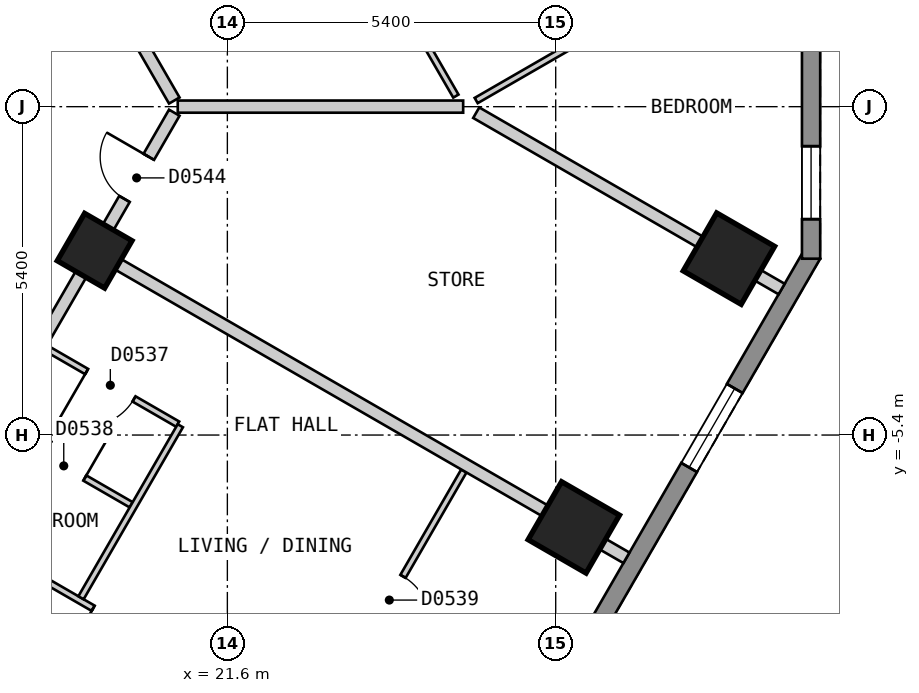
"""IFC4 building model, lengths in metres.
Left out: names, types, materials, properties, quantities, classifications, styles, units other than length and angle.
Written with IfcOpenShell. Run it as: python <this file> out.ifc"""

import sys

from ifc_helpers import new_model, si_unit, direction, frame, frame_2d, origin, origin_2d, place, context, subcontext, project, spatial, polyline, rectangle, outline, extrude, element, fill, save


model = new_model("IFC4")
c1 = context("Model", 3, precision=1e-05, world=origin(), true_north=direction((0.0, 1.0)))
c2 = subcontext(c1, "Body", "Model", "MODEL_VIEW")
j1 = project(units=[si_unit("LENGTHUNIT", "METRE"), si_unit("PLANEANGLEUNIT", "RADIAN")], contexts=[c1])
p1 = place(None, origin())
s1 = spatial("IfcSite", under=j1, at=p1, CompositionType="ELEMENT")
p2 = place(p1, origin())
s2 = spatial("IfcBuilding", under=s1, at=p2, CompositionType="ELEMENT")
p3 = place(p2, frame((0.0, 0.0, 50.4)))
s3 = spatial("IfcBuildingStorey", under=s2, at=p3, CompositionType="ELEMENT", Elevation=50.4)
for number, where, z_axis, x_axis in (
    (1, (27.298, -6.919, 0.0), (0.0, 0.0, 1.0), (0.5, 0.866, 0.0)),
    (2, (29.849, -2.499, 0.0), (0.0, 0.0, 1.0), (0.5, 0.866, 0.0)),
):
    element("IfcColumn", number, at=place(p3, frame(where, z_axis=z_axis, x_axis=x_axis)), inside=s3, PredefinedType="COLUMN", context=c2, shape_type="SweptSolid", body=[
        extrude(rectangle(XDim=1.1, YDim=1.1, at=origin_2d()), origin(), (0.0, 0.0, 1.0), 3.0),
    ])
p4 = place(p3, frame((19.417, -2.369, 0.0), z_axis=(0.0, 0.0, 1.0), x_axis=(0.499984884929, 0.866034130299, 0.0)))
e3 = element("IfcColumn", 3, at=p4, inside=s3, PredefinedType="COLUMN", context=c2, shape_type="SweptSolid", body=[
    extrude(rectangle(XDim=0.9, YDim=0.9, at=origin_2d()), origin(), (0.0, 0.0, 1.0), 3.0),
])
p5 = place(p3, frame((17.71, -25.825, 0.0), z_axis=(0.0, 0.0, 1.0), x_axis=(0.500001938803, 0.866024284413, 0.0)))
e4 = element("IfcWall", 4, at=p5, inside=s3, PredefinedType="SOLIDWALL", context=c2, shape_type="SweptSolid", body=[
    extrude(outline(polyline([(0.0, -0.15), (27.02, -0.15), (26.94, 0.15), (0.08, 0.15), (0.0, -0.15)])), origin(), (0.0, 0.0, 1.0), 2.7),
])
p6 = place(p5, frame((2.553, 0.0, 0.15)))
e5 = element("IfcOpeningElement", 5, at=p6, cuts=e4, PredefinedType="OPENING", context=c2, shape_type="SweptSolid", body=[
    extrude(rectangle(XDim=1.5, YDim=2.1, at=frame_2d((0.75, 1.05))), frame((0.0, 0.16, 0.0), z_axis=(0.0, -1.0, 0.0), x_axis=(1.0, 0.0, 0.0)), (0.0, 0.0, 1.0), 0.32),
])
p7 = place(p5, frame((7.658, 0.0, 0.15)))
e6 = element("IfcOpeningElement", 6, at=p7, cuts=e4, PredefinedType="OPENING", context=c2, shape_type="SweptSolid", body=[
    extrude(rectangle(XDim=1.5, YDim=2.1, at=frame_2d((0.75, 1.05))), frame((0.0, 0.16, 0.0), z_axis=(0.0, -1.0, 0.0), x_axis=(1.0, 0.0, 0.0)), (0.0, 0.0, 1.0), 0.32),
])
p8 = place(p5, frame((12.761, 0.0, 0.15)))
e7 = element("IfcOpeningElement", 7, at=p8, cuts=e4, PredefinedType="OPENING", context=c2, shape_type="SweptSolid", body=[
    extrude(rectangle(XDim=1.5, YDim=2.1, at=frame_2d((0.75, 1.05))), frame((0.0, 0.16, 0.0), z_axis=(0.0, -1.0, 0.0), x_axis=(1.0, 0.0, 0.0)), (0.0, 0.0, 1.0), 0.32),
])
p9 = place(p5, frame((17.865, 0.0, 0.15)))
e8 = element("IfcOpeningElement", 8, at=p9, cuts=e4, PredefinedType="OPENING", context=c2, shape_type="SweptSolid", body=[
    extrude(rectangle(XDim=1.5, YDim=2.1, at=frame_2d((0.75, 1.05))), frame((0.0, 0.16, 0.0), z_axis=(0.0, -1.0, 0.0), x_axis=(1.0, 0.0, 0.0)), (0.0, 0.0, 1.0), 0.32),
])
p10 = place(p5, frame((22.969, 0.0, 0.15)))
e9 = element("IfcOpeningElement", 9, at=p10, cuts=e4, PredefinedType="OPENING", context=c2, shape_type="SweptSolid", body=[
    extrude(rectangle(XDim=1.5, YDim=2.1, at=frame_2d((0.75, 1.05))), frame((0.0, 0.16, 0.0), z_axis=(0.0, -1.0, 0.0), x_axis=(1.0, 0.0, 0.0)), (0.0, 0.0, 1.0), 0.32),
])
p11 = place(p3, frame((31.2, -2.5, 0.0), z_axis=(0.0, 0.0, 1.0), x_axis=(0.0, 1.0, 0.0)))
e10 = element("IfcWall", 10, at=p11, inside=s3, PredefinedType="SOLIDWALL", context=c2, shape_type="SweptSolid", body=[
    extrude(outline(polyline([(0.0, -0.15), (5.0, -0.15), (4.92, 0.15), (0.08, 0.15), (0.0, -0.15)])), origin(), (0.0, 0.0, 1.0), 2.7),
])
p12 = place(p11, frame((0.65, 0.0, 0.15)))
e11 = element("IfcOpeningElement", 11, at=p12, cuts=e10, PredefinedType="OPENING", context=c2, shape_type="SweptSolid", body=[
    extrude(rectangle(XDim=1.2, YDim=2.1, at=frame_2d((0.6, 1.05))), frame((0.0, 0.16, 0.0), z_axis=(0.0, -1.0, 0.0), x_axis=(1.0, 0.0, 0.0)), (0.0, 0.0, 1.0), 0.32),
])
p13 = place(p3, frame((10.45, 17.9, 0.0), z_axis=(0.0, 0.0, 1.0), x_axis=(0.500034352617, -0.866005569383, 0.0)))
e12 = element("IfcWall", 12, at=p13, inside=s3, PredefinedType="PARTITIONING", context=c2, shape_type="SweptSolid", body=[
    extrude(rectangle(XDim=20.553, YDim=0.2, at=frame_2d((10.276, 0.0))), origin(), (0.0, 0.0, 1.0), 2.7),
])
p14 = place(p13, frame((14.902, 0.0, 0.0)))
e13 = element("IfcOpeningElement", 13, at=p14, cuts=e12, PredefinedType="OPENING", context=c2, shape_type="SweptSolid", body=[
    extrude(rectangle(XDim=1.0, YDim=2.1, at=frame_2d((0.5, 1.05))), frame((0.0, 0.11, 0.0), z_axis=(0.0, -1.0, 0.0), x_axis=(1.0, 0.0, 0.0)), (0.0, 0.0, 1.0), 0.22),
])
p15 = place(p13, frame((4.671, 0.0, 0.0)))
e14 = element("IfcOpeningElement", 14, at=p15, cuts=e12, PredefinedType="OPENING", context=c2, shape_type="SweptSolid", body=[
    extrude(rectangle(XDim=1.0, YDim=2.1, at=frame_2d((0.5, 1.05))), frame((0.0, 0.11, 0.0), z_axis=(0.0, -1.0, 0.0), x_axis=(1.0, 0.0, 0.0)), (0.0, 0.0, 1.0), 0.22),
])
p16 = place(p3, frame((15.707, -8.794, 0.0), z_axis=(0.0, 0.0, 1.0), x_axis=(0.50000451406, 0.866022797575, 0.0)))
e15 = element("IfcWall", 15, at=p16, inside=s3, PredefinedType="PARTITIONING", context=c2, shape_type="SweptSolid", body=[
    extrude(rectangle(XDim=10.04, YDim=0.2, at=frame_2d((5.02, 0.0))), origin(), (0.0, 0.0, 1.0), 2.7),
])
p17 = place(p16, frame((4.367, 0.0, 0.0)))
e16 = element("IfcOpeningElement", 16, at=p17, cuts=e15, PredefinedType="OPENING", context=c2, shape_type="SweptSolid", body=[
    extrude(rectangle(XDim=1.0, YDim=2.1, at=frame_2d((0.5, 1.05))), frame((0.0, 0.11, 0.0), z_axis=(0.0, -1.0, 0.0), x_axis=(1.0, 0.0, 0.0)), (0.0, 0.0, 1.0), 0.22),
])
p18 = place(p16, frame((8.402, 0.0, 0.0)))
e17 = element("IfcOpeningElement", 17, at=p18, cuts=e15, PredefinedType="OPENING", context=c2, shape_type="SweptSolid", body=[
    extrude(rectangle(XDim=0.8, YDim=2.1, at=frame_2d((0.4, 1.05))), frame((0.0, 0.11, 0.0), z_axis=(0.0, -1.0, 0.0), x_axis=(1.0, 0.0, 0.0)), (0.0, 0.0, 1.0), 0.22),
])
p19 = place(p3, frame((17.844, -5.292, 0.0), z_axis=(0.0, 0.0, 1.0), x_axis=(0.866038211682, -0.499977815414, 0.0)))
e18 = element("IfcWall", 18, at=p19, inside=s3, PredefinedType="PARTITIONING", context=c2, shape_type="SweptSolid", body=[
    extrude(rectangle(XDim=2.51, YDim=0.1, at=frame_2d((1.255, 0.0))), origin(), (0.0, 0.0, 1.0), 2.7),
])
p20 = place(p19, frame((0.83, 0.0, 0.0)))
e19 = element("IfcOpeningElement", 19, at=p20, cuts=e18, PredefinedType="OPENING", context=c2, shape_type="SweptSolid", body=[
    extrude(rectangle(XDim=0.8, YDim=2.1, at=frame_2d((0.4, 1.05))), frame((0.0, 0.06, 0.0), z_axis=(0.0, -1.0, 0.0), x_axis=(1.0, 0.0, 0.0)), (0.0, 0.0, 1.0), 0.12),
])
p21 = place(p3, frame((18.61, -3.966, 0.0), z_axis=(0.0, 0.0, 1.0), x_axis=(0.865958718457, -0.500115484592, 0.0)))
e20 = element("IfcWall", 20, at=p21, inside=s3, PredefinedType="PARTITIONING", context=c2, shape_type="SweptSolid", body=[
    extrude(rectangle(XDim=2.509, YDim=0.1, at=frame_2d((1.255, 0.0))), origin(), (0.0, 0.0, 1.0), 2.7),
])
p22 = place(p21, frame((0.78, 0.0, 0.0)))
e21 = element("IfcOpeningElement", 21, at=p22, cuts=e20, PredefinedType="OPENING", context=c2, shape_type="SweptSolid", body=[
    extrude(rectangle(XDim=0.9, YDim=2.1, at=frame_2d((0.45, 1.05))), frame((0.0, 0.06, 0.0), z_axis=(0.0, -1.0, 0.0), x_axis=(1.0, 0.0, 0.0)), (0.0, 0.0, 1.0), 0.12),
])
p23 = place(p3, frame((16.951, -6.839, 0.0), z_axis=(0.0, 0.0, 1.0), x_axis=(0.866022959057, -0.500004234368, 0.0)))
e22 = element("IfcWall", 22, at=p23, inside=s3, PredefinedType="PARTITIONING", context=c2, shape_type="SweptSolid", body=[
    extrude(rectangle(XDim=10.0, YDim=0.1, at=frame_2d((5.0, 0.0))), origin(), (0.0, 0.0, 1.0), 2.7),
])
p24 = place(p23, frame((4.995, 0.0, 0.0)))
e23 = element("IfcOpeningElement", 23, at=p24, cuts=e22, PredefinedType="OPENING", context=c2, shape_type="SweptSolid", body=[
    extrude(rectangle(XDim=0.9, YDim=2.1, at=frame_2d((0.45, 1.05))), frame((0.0, 0.06, 0.0), z_axis=(0.0, -1.0, 0.0), x_axis=(1.0, 0.0, 0.0)), (0.0, 0.0, 1.0), 0.12),
])
p25 = place(p23, frame((2.82, 0.0, 0.0)))
e24 = element("IfcOpeningElement", 24, at=p25, cuts=e22, PredefinedType="OPENING", context=c2, shape_type="SweptSolid", body=[
    extrude(rectangle(XDim=0.8, YDim=2.1, at=frame_2d((0.4, 1.05))), frame((0.0, 0.06, 0.0), z_axis=(0.0, -1.0, 0.0), x_axis=(1.0, 0.0, 0.0)), (0.0, 0.0, 1.0), 0.12),
])
p26 = place(p3, frame((19.193, -8.076, 0.0), z_axis=(0.0, 0.0, 1.0), x_axis=(0.499901468276, 0.866082283629, 0.0)))
e25 = element("IfcWall", 25, at=p26, inside=s3, PredefinedType="PARTITIONING", context=c2, shape_type="SweptSolid", body=[
    extrude(rectangle(XDim=3.266, YDim=0.1, at=frame_2d((1.633, 0.0))), origin(), (0.0, 0.0, 1.0), 2.7),
])
p27 = place(p3, frame((23.013, -10.281, 0.0), z_axis=(0.0, 0.0, 1.0), x_axis=(0.499881743012, 0.866093668724, 0.0)))
e26 = element("IfcWall", 26, at=p27, inside=s3, PredefinedType="PARTITIONING", context=c2, shape_type="SweptSolid", body=[
    extrude(rectangle(XDim=4.953, YDim=0.1, at=frame_2d((2.477, 0.0))), origin(), (0.0, 0.0, 1.0), 2.7),
])
p28 = place(p27, frame((2.052, 0.0, 0.0)))
e27 = element("IfcOpeningElement", 27, at=p28, cuts=e26, PredefinedType="OPENING", context=c2, shape_type="SweptSolid", body=[
    extrude(rectangle(XDim=0.9, YDim=2.1, at=frame_2d((0.45, 1.05))), frame((0.0, 0.06, 0.0), z_axis=(0.0, -1.0, 0.0), x_axis=(1.0, 0.0, 0.0)), (0.0, 0.0, 1.0), 0.12),
])
p29 = place(p3, frame((25.692, 0.101, 0.0), z_axis=(0.0, 0.0, 1.0), x_axis=(0.866116197112, 0.49984270836, 0.0)))
e28 = element("IfcWall", 28, at=p29, inside=s3, PredefinedType="PARTITIONING", context=c2, shape_type="SweptSolid", body=[
    extrude(rectangle(XDim=5.8, YDim=0.1, at=frame_2d((2.9, 0.0))), origin(), (0.0, 0.0, 1.0), 2.7),
])
p30 = place(p29, frame((2.35, 0.0, 0.0)))
e29 = element("IfcOpeningElement", 29, at=p30, cuts=e28, PredefinedType="OPENING", context=c2, shape_type="SweptSolid", body=[
    extrude(rectangle(XDim=0.9, YDim=2.1, at=frame_2d((0.45, 1.05))), frame((0.0, 0.06, 0.0), z_axis=(0.0, -1.0, 0.0), x_axis=(1.0, 0.0, 0.0)), (0.0, 0.0, 1.0), 0.12),
])
p31 = place(p3, frame((19.503, -2.419, 0.0), z_axis=(0.0, 0.0, 1.0), x_axis=(0.866022959057, -0.500004234368, 0.0)))
e30 = element("IfcWall", 30, at=p31, inside=s3, PredefinedType="PARTITIONING", context=c2, shape_type="SweptSolid", body=[
    extrude(rectangle(XDim=10.0, YDim=0.2, at=frame_2d((5.0, 0.0))), origin(), (0.0, 0.0, 1.0), 2.7),
])
p32 = place(p3, frame((25.693, -0.099, 0.0), z_axis=(0.0, 0.0, 1.0), x_axis=(0.866032775405, -0.499987231761, 0.0)))
e31 = element("IfcWall", 31, at=p32, inside=s3, PredefinedType="PARTITIONING", context=c2, shape_type="SweptSolid", body=[
    extrude(rectangle(XDim=5.8, YDim=0.2, at=frame_2d((2.9, 0.0))), origin(), (0.0, 0.0, 1.0), 2.7),
])
p33 = place(p3, frame((20.784, 0.001, 0.0), z_axis=(0.0, 0.0, 1.0), x_axis=(1.0, 0.0, 0.0)))
e32 = element("IfcWall", 32, at=p33, inside=s3, PredefinedType="PARTITIONING", context=c2, shape_type="SweptSolid", body=[
    extrude(rectangle(XDim=4.694, YDim=0.2, at=frame_2d((2.347, 0.0))), origin(), (0.0, 0.0, 1.0), 2.7),
])
p34 = place(p3, frame((22.921, 4.394, 0.0), z_axis=(0.0, 0.0, 1.0), x_axis=(0.500093956194, -0.865971151354, 0.0)))
e33 = element("IfcWall", 33, at=p34, inside=s3, PredefinedType="PARTITIONING", context=c2, shape_type="SweptSolid", body=[
    extrude(rectangle(XDim=4.873, YDim=0.1, at=frame_2d((2.437, 0.0))), origin(), (0.0, 0.0, 1.0), 2.7),
])
p35 = place(p34, frame((2.137, 0.0, 0.0)))
e34 = element("IfcOpeningElement", 34, at=p35, cuts=e33, PredefinedType="OPENING", context=c2, shape_type="SweptSolid", body=[
    extrude(rectangle(XDim=0.8, YDim=2.1, at=frame_2d((0.4, 1.05))), frame((0.0, 0.06, 0.0), z_axis=(0.0, -1.0, 0.0), x_axis=(1.0, 0.0, 0.0)), (0.0, 0.0, 1.0), 0.12),
])
p36 = place(p10, origin())
e35 = element("IfcWindow", 35, at=p36, inside=s3, PartitioningType="SINGLE_PANEL", PredefinedType="WINDOW", context=c2, shape_type="SweptSolid", body=[
    extrude(rectangle(XDim=1.5, YDim=2.1, at=frame_2d((0.75, 1.05))), frame((0.0, 0.03, 0.0), z_axis=(0.0, -1.0, 0.0), x_axis=(1.0, 0.0, 0.0)), (0.0, 0.0, 1.0), 0.06),
])
fill(e9, e35)
p37 = place(p12, origin())
e36 = element("IfcWindow", 36, at=p37, inside=s3, PartitioningType="SINGLE_PANEL", PredefinedType="WINDOW", context=c2, shape_type="SweptSolid", body=[
    extrude(rectangle(XDim=1.2, YDim=2.1, at=frame_2d((0.6, 1.05))), frame((0.0, 0.03, 0.0), z_axis=(0.0, -1.0, 0.0), x_axis=(1.0, 0.0, 0.0)), (0.0, 0.0, 1.0), 0.06),
])
fill(e11, e36)
p38 = place(p22, origin())
e37 = element("IfcDoor", 37, at=p38, inside=s3, OperationType="SINGLE_SWING_LEFT", PredefinedType="DOOR", context=c2, shape_type="SweptSolid", body=[
    extrude(rectangle(XDim=0.9, YDim=2.1, at=frame_2d((0.45, 1.05))), frame((0.0, 0.025, 0.0), z_axis=(0.0, -1.0, 0.0), x_axis=(1.0, 0.0, 0.0)), (0.0, 0.0, 1.0), 0.05),
])
fill(e21, e37)
p39 = place(p20, origin())
e38 = element("IfcDoor", 38, at=p39, inside=s3, OperationType="SINGLE_SWING_RIGHT", PredefinedType="DOOR", context=c2, shape_type="SweptSolid", body=[
    extrude(rectangle(XDim=0.8, YDim=2.1, at=frame_2d((0.4, 1.05))), frame((0.0, 0.025, 0.0), z_axis=(0.0, -1.0, 0.0), x_axis=(1.0, 0.0, 0.0)), (0.0, 0.0, 1.0), 0.05),
])
fill(e19, e38)
p40 = place(p28, origin())
e39 = element("IfcDoor", 39, at=p40, inside=s3, OperationType="SINGLE_SWING_LEFT", PredefinedType="DOOR", context=c2, shape_type="SweptSolid", body=[
    extrude(rectangle(XDim=0.9, YDim=2.1, at=frame_2d((0.45, 1.05))), frame((0.0, 0.025, 0.0), z_axis=(0.0, -1.0, 0.0), x_axis=(1.0, 0.0, 0.0)), (0.0, 0.0, 1.0), 0.05),
])
fill(e27, e39)
p41 = place(p25, origin())
e40 = element("IfcDoor", 40, at=p41, inside=s3, OperationType="SINGLE_SWING_LEFT", PredefinedType="DOOR", context=c2, shape_type="SweptSolid", body=[
    extrude(rectangle(XDim=0.8, YDim=2.1, at=frame_2d((0.4, 1.05))), frame((0.0, 0.025, 0.0), z_axis=(0.0, -1.0, 0.0), x_axis=(1.0, 0.0, 0.0)), (0.0, 0.0, 1.0), 0.05),
])
fill(e24, e40)
p42 = place(p18, origin())
e41 = element("IfcDoor", 41, at=p42, inside=s3, OperationType="SINGLE_SWING_RIGHT", PredefinedType="DOOR", context=c2, shape_type="SweptSolid", body=[
    extrude(rectangle(XDim=0.8, YDim=2.1, at=frame_2d((0.4, 1.05))), frame((0.0, 0.025, 0.0), z_axis=(0.0, -1.0, 0.0), x_axis=(1.0, 0.0, 0.0)), (0.0, 0.0, 1.0), 0.05),
])
fill(e17, e41)
save(model, sys.argv[1])
